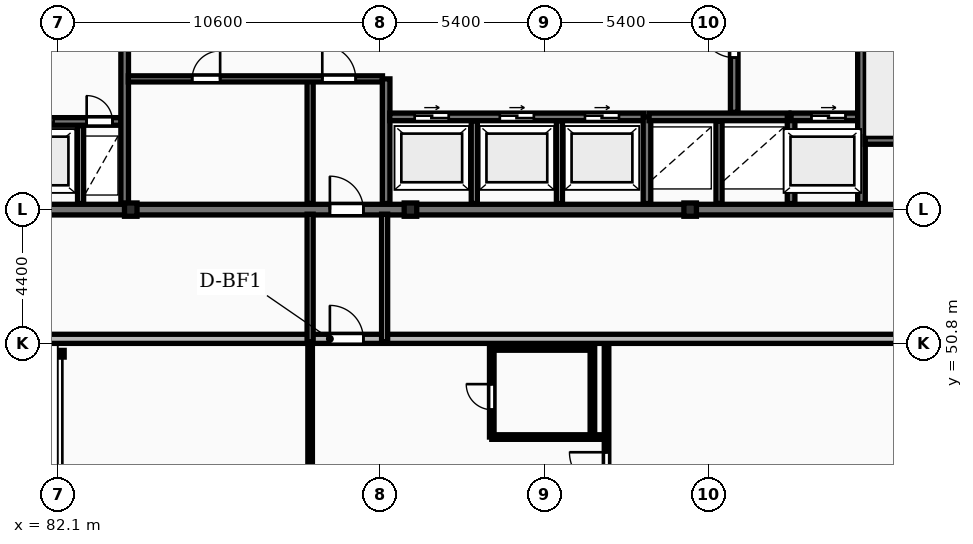
"""IFC4 building model, lengths in metres.
Left out: names, types, materials, properties, quantities, classifications, styles, units other than length and angle.
Written with IfcOpenShell. Run it as: python <this file> out.ifc"""

import sys

from ifc_helpers import new_model, si_unit, direction, frame, frame_2d, origin, origin_2d, place, context, subcontext, project, spatial, rectangle, i_section, extrude, element, fill, save


model = new_model("IFC4")
c1 = context("Model", 3, precision=1e-05, world=origin(), true_north=direction((0.0, 1.0)))
c2 = subcontext(c1, "Body", "Model", "MODEL_VIEW")
j1 = project(units=[si_unit("LENGTHUNIT", "METRE"), si_unit("PLANEANGLEUNIT", "RADIAN")], contexts=[c1])
p1 = place(None, origin())
s1 = spatial("IfcSite", under=j1, at=p1, CompositionType="ELEMENT")
p2 = place(p1, origin())
s2 = spatial("IfcBuilding", under=s1, at=p2, CompositionType="ELEMENT")
p3 = place(p2, frame((0.0, 0.0, 139.3)))
s3 = spatial("IfcBuildingStorey", under=s2, at=p3, CompositionType="ELEMENT", Elevation=139.3)
for number, where, z_axis, x_axis in (
    (1, (84.5, 55.2, 0.0), (0.0, 0.0, 1.0), (1.0, 0.0, 0.0)),
    (2, (93.7, 55.2, 0.0), (0.0, 0.0, 1.0), (1.0, 0.0, 0.0)),
    (3, (102.9, 55.2, 0.0), (0.0, 0.0, 1.0), (1.0, 0.0, 0.0)),
):
    element("IfcColumn", number, at=place(p3, frame(where, z_axis=z_axis, x_axis=x_axis)), inside=s3, PredefinedType="COLUMN", context=c2, shape_type="SweptSolid", body=[
        extrude(i_section(OverallWidth=0.412, OverallDepth=0.437, WebThickness=0.036, FlangeThickness=0.052, FilletRadius=0.015, at=origin_2d()), origin(), (0.0, 0.0, 1.0), 3.6),
    ])
p4 = place(p3, frame((57.6, 50.95, 0.0), z_axis=(0.0, 0.0, 1.0), x_axis=(1.0, 0.0, 0.0)))
e4 = element("IfcWall", 4, at=p4, inside=s3, PredefinedType="STANDARD", context=c2, shape_type="SweptSolid", body=[
    extrude(rectangle(XDim=73.0, YDim=0.3, at=frame_2d((36.5, 0.0))), origin(), (0.0, 0.0, 1.0), 3.31),
])
p5 = place(p4, frame((15.225, 0.0, 0.85)))
e5 = element("IfcOpeningElement", 5, at=p5, cuts=e4, PredefinedType="OPENING", context=c2, shape_type="SweptSolid", body=[
    extrude(rectangle(XDim=1.8, YDim=1.8, at=frame_2d((0.9, 0.9))), frame((0.0, 0.16, 0.0), z_axis=(0.0, -1.0, 0.0), x_axis=(1.0, 0.0, 0.0)), (0.0, 0.0, 1.0), 0.32),
])
p6 = place(p4, frame((58.575, 0.0, 0.85)))
e6 = element("IfcOpeningElement", 6, at=p6, cuts=e4, PredefinedType="OPENING", context=c2, shape_type="SweptSolid", body=[
    extrude(rectangle(XDim=1.8, YDim=1.8, at=frame_2d((0.9, 0.9))), frame((0.0, 0.16, 0.0), z_axis=(0.0, -1.0, 0.0), x_axis=(1.0, 0.0, 0.0)), (0.0, 0.0, 1.0), 0.32),
])
p7 = place(p4, frame((33.45, 0.0, 0.0)))
e7 = element("IfcOpeningElement", 7, at=p7, cuts=e4, PredefinedType="OPENING", context=c2, shape_type="SweptSolid", body=[
    extrude(rectangle(XDim=1.1, YDim=2.1, at=frame_2d((0.55, 1.05))), frame((0.0, 0.16, 0.0), z_axis=(0.0, -1.0, 0.0), x_axis=(1.0, 0.0, 0.0)), (0.0, 0.0, 1.0), 0.32),
])
p8 = place(p3, frame((75.95, 55.2, 0.0), z_axis=(0.0, 0.0, 1.0), x_axis=(1.0, 0.0, 0.0)))
e8 = element("IfcWall", 8, at=p8, inside=s3, PredefinedType="SHEAR", context=c2, shape_type="SweptSolid", body=[
    extrude(rectangle(XDim=36.3, YDim=0.35, at=frame_2d((18.15, 0.0))), origin(), (0.0, 0.0, 1.0), 3.6),
])
p9 = place(p8, frame((15.1, 0.0, 0.0)))
e9 = element("IfcOpeningElement", 9, at=p9, cuts=e8, PredefinedType="OPENING", context=c2, shape_type="SweptSolid", body=[
    extrude(rectangle(XDim=1.1, YDim=2.1, at=frame_2d((0.55, 1.05))), frame((0.0, 0.185, 0.0), z_axis=(0.0, -1.0, 0.0), x_axis=(1.0, 0.0, 0.0)), (0.0, 0.0, 1.0), 0.37),
])
p10 = place(p3, frame((79.79, 58.1, 0.0), z_axis=(0.0, 0.0, 1.0), x_axis=(1.0, 0.0, 0.0)))
e10 = element("IfcWall", 10, at=p10, inside=s3, PredefinedType="SHEAR", context=c2, shape_type="SweptSolid", body=[
    extrude(rectangle(XDim=4.39, YDim=0.25, at=frame_2d((2.195, 0.0))), origin(), (0.0, 0.0, 1.0), 3.6),
])
p11 = place(p10, frame((1.05, 0.0, 0.0)))
e11 = element("IfcOpeningElement", 11, at=p11, cuts=e10, PredefinedType="OPENING", context=c2, shape_type="SweptSolid", body=[
    extrude(rectangle(XDim=1.12, YDim=2.12, at=frame_2d((0.56, 1.06))), frame((0.0, 0.135, 0.0), z_axis=(0.0, -1.0, 0.0), x_axis=(1.0, 0.0, 0.0)), (0.0, 0.0, 1.0), 0.27),
])
p12 = place(p10, frame((3.26, 0.0, 0.0)))
e12 = element("IfcOpeningElement", 12, at=p12, cuts=e10, PredefinedType="OPENING", context=c2, shape_type="SweptSolid", body=[
    extrude(rectangle(XDim=0.85, YDim=2.05, at=frame_2d((0.425, 1.025))), frame((0.0, 0.135, 0.0), z_axis=(0.0, -1.0, 0.0), x_axis=(1.0, 0.0, 0.0)), (0.0, 0.0, 1.0), 0.27),
])
p13 = place(p3, frame((82.85, 55.4, 0.0), z_axis=(0.0, 0.0, 1.0), x_axis=(0.0, 1.0, 0.0)))
e13 = element("IfcWall", 13, at=p13, inside=s3, PredefinedType="PARTITIONING", context=c2, shape_type="SweptSolid", body=[
    extrude(rectangle(XDim=2.56, YDim=0.2, at=frame_2d((1.28, 0.0))), origin(), (0.0, 0.0, 1.0), 3.31),
])
p14 = place(p3, frame((84.3, 55.4, 0.0), z_axis=(0.0, 0.0, 1.0), x_axis=(0.0, 1.0, 0.0)))
e14 = element("IfcWall", 14, at=p14, inside=s3, PredefinedType="SHEAR", context=c2, shape_type="SweptSolid", body=[
    extrude(rectangle(XDim=11.6, YDim=0.25, at=frame_2d((5.8, 0.0))), origin(), (0.0, 0.0, 1.0), 3.6),
])
p15 = place(p14, frame((5.2, 0.0, 0.0)))
e15 = element("IfcOpeningElement", 15, at=p15, cuts=e14, PredefinedType="OPENING", context=c2, shape_type="SweptSolid", body=[
    extrude(rectangle(XDim=1.1, YDim=2.1, at=frame_2d((0.55, 1.05))), frame((0.0, 0.135, 0.0), z_axis=(0.0, -1.0, 0.0), x_axis=(1.0, 0.0, 0.0)), (0.0, 0.0, 1.0), 0.27),
])
p16 = place(p3, frame((90.4, 55.4, 0.0), z_axis=(0.0, 0.0, 1.0), x_axis=(0.0, 1.0, 0.0)))
e16 = element("IfcWall", 16, at=p16, inside=s3, PredefinedType="PARTITIONING", context=c2, shape_type="SweptSolid", body=[
    extrude(rectangle(XDim=4.1, YDim=0.2, at=frame_2d((2.05, 0.0))), origin(), (0.0, 0.0, 1.0), 3.31),
])
p17 = place(p3, frame((84.42, 59.5, 0.0), z_axis=(0.0, 0.0, 1.0), x_axis=(1.0, 0.0, 0.0)))
e17 = element("IfcWall", 17, at=p17, inside=s3, PredefinedType="PARTITIONING", context=c2, shape_type="SweptSolid", body=[
    extrude(rectangle(XDim=8.36, YDim=0.2, at=frame_2d((4.18, 0.0))), origin(), (0.0, 0.0, 1.0), 3.31),
])
p18 = place(p17, frame((2.1, 0.0, 0.0)))
e18 = element("IfcOpeningElement", 18, at=p18, cuts=e17, PredefinedType="OPENING", context=c2, shape_type="SweptSolid", body=[
    extrude(rectangle(XDim=0.92, YDim=2.08, at=frame_2d((0.46, 1.04))), frame((0.0, 0.11, 0.0), z_axis=(0.0, -1.0, 0.0), x_axis=(1.0, 0.0, 0.0)), (0.0, 0.0, 1.0), 0.22),
])
p19 = place(p17, frame((6.38, 0.0, 0.0)))
e19 = element("IfcOpeningElement", 19, at=p19, cuts=e17, PredefinedType="OPENING", context=c2, shape_type="SweptSolid", body=[
    extrude(rectangle(XDim=1.1, YDim=2.1, at=frame_2d((0.55, 1.05))), frame((0.0, 0.11, 0.0), z_axis=(0.0, -1.0, 0.0), x_axis=(1.0, 0.0, 0.0)), (0.0, 0.0, 1.0), 0.22),
])
p20 = place(p3, frame((92.9, 55.4, 0.0), z_axis=(0.0, 0.0, 1.0), x_axis=(0.0, 1.0, 0.0)))
e20 = element("IfcWall", 20, at=p20, inside=s3, PredefinedType="SHEAR", context=c2, shape_type="SweptSolid", body=[
    extrude(rectangle(XDim=4.1, YDim=0.25, at=frame_2d((2.05, 0.0))), origin(), (0.0, 0.0, 1.0), 3.6),
])
for number, where, z_axis, x_axis in (
    (21, (95.8, 55.4, 0.0), (0.0, 0.0, 1.0), (0.0, 1.0, 0.0)),
    (22, (98.6, 55.4, 0.0), (0.0, 0.0, 1.0), (0.0, 1.0, 0.0)),
):
    element("IfcWall", number, at=place(p3, frame(where, z_axis=z_axis, x_axis=x_axis)), inside=s3, PredefinedType="PARTITIONING", context=c2, shape_type="SweptSolid", body=[
        extrude(rectangle(XDim=2.72, YDim=0.2, at=frame_2d((1.36, 0.0))), origin(), (0.0, 0.0, 1.0), 3.31),
    ])
p21 = place(p3, frame((93.02, 58.25, 0.0), z_axis=(0.0, 0.0, 1.0), x_axis=(1.0, 0.0, 0.0)))
e23 = element("IfcWall", 23, at=p21, inside=s3, PredefinedType="SHEAR", context=c2, shape_type="SweptSolid", body=[
    extrude(rectangle(XDim=8.36, YDim=0.25, at=frame_2d((4.18, 0.0))), origin(), (0.0, 0.0, 1.0), 3.6),
])
p22 = place(p21, frame((0.82, 0.0, 0.0)))
e24 = element("IfcOpeningElement", 24, at=p22, cuts=e23, PredefinedType="OPENING", context=c2, shape_type="SweptSolid", body=[
    extrude(rectangle(XDim=1.12, YDim=2.12, at=frame_2d((0.56, 1.06))), frame((0.0, 0.135, 0.0), z_axis=(0.0, -1.0, 0.0), x_axis=(1.0, 0.0, 0.0)), (0.0, 0.0, 1.0), 0.27),
])
p23 = place(p21, frame((3.62, 0.0, 0.0)))
e25 = element("IfcOpeningElement", 25, at=p23, cuts=e23, PredefinedType="OPENING", context=c2, shape_type="SweptSolid", body=[
    extrude(rectangle(XDim=1.12, YDim=2.12, at=frame_2d((0.56, 1.06))), frame((0.0, 0.135, 0.0), z_axis=(0.0, -1.0, 0.0), x_axis=(1.0, 0.0, 0.0)), (0.0, 0.0, 1.0), 0.27),
])
p24 = place(p21, frame((6.42, 0.0, 0.0)))
e26 = element("IfcOpeningElement", 26, at=p24, cuts=e23, PredefinedType="OPENING", context=c2, shape_type="SweptSolid", body=[
    extrude(rectangle(XDim=1.12, YDim=2.12, at=frame_2d((0.56, 1.06))), frame((0.0, 0.135, 0.0), z_axis=(0.0, -1.0, 0.0), x_axis=(1.0, 0.0, 0.0)), (0.0, 0.0, 1.0), 0.27),
])
p25 = place(p3, frame((101.48, 55.4, 0.0), z_axis=(0.0, 0.0, 1.0), x_axis=(0.0, 1.0, 0.0)))
e27 = element("IfcWall", 27, at=p25, inside=s3, PredefinedType="SHEAR", context=c2, shape_type="SweptSolid", body=[
    extrude(rectangle(XDim=2.85, YDim=0.25, at=frame_2d((1.425, 0.0))), origin(), (0.0, 0.0, 1.0), 3.6),
])
p26 = place(p3, frame((103.85, 55.4, 0.0), z_axis=(0.0, 0.0, 1.0), x_axis=(0.0, 1.0, 0.0)))
e28 = element("IfcWall", 28, at=p26, inside=s3, PredefinedType="PARTITIONING", context=c2, shape_type="SweptSolid", body=[
    extrude(rectangle(XDim=2.72, YDim=0.2, at=frame_2d((1.36, 0.0))), origin(), (0.0, 0.0, 1.0), 3.31),
])
p27 = place(p3, frame((101.55, 58.25, 0.0), z_axis=(0.0, 0.0, 1.0), x_axis=(1.0, 0.0, 0.0)))
e29 = element("IfcWall", 29, at=p27, inside=s3, PredefinedType="SHEAR", context=c2, shape_type="SweptSolid", body=[
    extrude(rectangle(XDim=4.6, YDim=0.25, at=frame_2d((2.3, 0.0))), origin(), (0.0, 0.0, 1.0), 3.6),
])
p28 = place(p3, frame((106.22, 55.4, 0.0), z_axis=(0.0, 0.0, 1.0), x_axis=(0.0, 1.0, 0.0)))
e30 = element("IfcWall", 30, at=p28, inside=s3, PredefinedType="SHEAR", context=c2, shape_type="SweptSolid", body=[
    extrude(rectangle(XDim=2.85, YDim=0.25, at=frame_2d((1.425, 0.0))), origin(), (0.0, 0.0, 1.0), 3.6),
])
p29 = place(p3, frame((106.22, 58.25, 0.0), z_axis=(0.0, 0.0, 1.0), x_axis=(1.0, 0.0, 0.0)))
e31 = element("IfcWall", 31, at=p29, inside=s3, PredefinedType="SHEAR", context=c2, shape_type="SweptSolid", body=[
    extrude(rectangle(XDim=2.46, YDim=0.25, at=frame_2d((1.23, 0.0))), origin(), (0.0, 0.0, 1.0), 3.6),
])
p30 = place(p29, frame((0.67, 0.0, 0.0)))
e32 = element("IfcOpeningElement", 32, at=p30, cuts=e31, PredefinedType="OPENING", context=c2, shape_type="SweptSolid", body=[
    extrude(rectangle(XDim=1.12, YDim=2.12, at=frame_2d((0.56, 1.06))), frame((0.0, 0.135, 0.0), z_axis=(0.0, -1.0, 0.0), x_axis=(1.0, 0.0, 0.0)), (0.0, 0.0, 1.0), 0.27),
])
p31 = place(p3, frame((104.35, 58.4, 0.0), z_axis=(0.0, 0.0, 1.0), x_axis=(0.0, 1.0, 0.0)))
e33 = element("IfcWall", 33, at=p31, inside=s3, PredefinedType="SHEAR", context=c2, shape_type="SweptSolid", body=[
    extrude(rectangle(XDim=8.6, YDim=0.25, at=frame_2d((4.3, 0.0))), origin(), (0.0, 0.0, 1.0), 3.6),
])
p32 = place(p31, frame((1.8, 0.0, 0.0)))
e34 = element("IfcOpeningElement", 34, at=p32, cuts=e33, PredefinedType="OPENING", context=c2, shape_type="SweptSolid", body=[
    extrude(rectangle(XDim=1.1, YDim=2.1, at=frame_2d((0.55, 1.05))), frame((0.0, 0.135, 0.0), z_axis=(0.0, -1.0, 0.0), x_axis=(1.0, 0.0, 0.0)), (0.0, 0.0, 1.0), 0.27),
])
p33 = place(p3, frame((108.535, 55.4, 0.0), z_axis=(0.0, 0.0, 1.0), x_axis=(0.0, 1.0, 0.0)))
e35 = element("IfcWall", 35, at=p33, inside=s3, PredefinedType="SHEAR", context=c2, shape_type="SweptSolid", body=[
    extrude(rectangle(XDim=11.6, YDim=0.25, at=frame_2d((5.8, 0.0))), origin(), (0.0, 0.0, 1.0), 3.6),
])
p34 = place(p33, frame((8.2, 0.0, 0.0)))
e36 = element("IfcOpeningElement", 36, at=p34, cuts=e35, PredefinedType="OPENING", context=c2, shape_type="SweptSolid", body=[
    extrude(rectangle(XDim=1.1, YDim=2.1, at=frame_2d((0.55, 1.05))), frame((0.0, 0.135, 0.0), z_axis=(0.0, -1.0, 0.0), x_axis=(1.0, 0.0, 0.0)), (0.0, 0.0, 1.0), 0.27),
])
p35 = place(p33, frame((10.25, 0.0, 0.0)))
e37 = element("IfcOpeningElement", 37, at=p35, cuts=e35, PredefinedType="OPENING", context=c2, shape_type="SweptSolid", body=[
    extrude(rectangle(XDim=0.85, YDim=2.05, at=frame_2d((0.425, 1.025))), frame((0.0, 0.135, 0.0), z_axis=(0.0, -1.0, 0.0), x_axis=(1.0, 0.0, 0.0)), (0.0, 0.0, 1.0), 0.27),
])
p36 = place(p3, frame((108.66, 57.475, 0.0), z_axis=(0.0, 0.0, 1.0), x_axis=(1.0, 0.0, 0.0)))
e38 = element("IfcWall", 38, at=p36, inside=s3, PredefinedType="SHEAR", context=c2, shape_type="SweptSolid", body=[
    extrude(rectangle(XDim=3.24, YDim=0.25, at=frame_2d((1.62, 0.0))), origin(), (0.0, 0.0, 1.0), 3.6),
])
for number, where, z_axis, x_axis in (
    (39, (90.4, 50.85, 0.0), (0.0, 0.0, 1.0), (0.0, 1.0, 0.0)),
    (40, (92.85, 50.85, 0.0), (0.0, 0.0, 1.0), (0.0, 1.0, 0.0)),
):
    element("IfcWall", number, at=place(p3, frame(where, z_axis=z_axis, x_axis=x_axis)), inside=s3, PredefinedType="PARTITIONING", context=c2, shape_type="SweptSolid", body=[
        extrude(rectangle(XDim=4.2, YDim=0.2, at=frame_2d((2.1, 0.0))), origin(), (0.0, 0.0, 1.0), 3.31),
    ])
p37 = place(p3, frame((96.375, 50.65, 0.0), z_axis=(0.0, 0.0, 1.0), x_axis=(1.0, 0.0, 0.0)))
e41 = element("IfcWall", 41, at=p37, inside=s3, PredefinedType="PARTITIONING", context=c2, shape_type="SweptSolid", body=[
    extrude(rectangle(XDim=3.31, YDim=0.15, at=frame_2d((1.655, 0.0))), origin(), (0.0, 0.0, 1.0), 2.69),
])
p38 = place(p3, frame((96.375, 47.72, 0.0), z_axis=(0.0, 0.0, 1.0), x_axis=(0.0, 1.0, 0.0)))
e42 = element("IfcWall", 42, at=p38, inside=s3, PredefinedType="PARTITIONING", context=c2, shape_type="SweptSolid", body=[
    extrude(rectangle(XDim=2.93, YDim=0.15, at=frame_2d((1.465, 0.0))), origin(), (0.0, 0.0, 1.0), 2.383),
])
p39 = place(p38, frame((0.9, 0.0, 0.0)))
e43 = element("IfcOpeningElement", 43, at=p39, cuts=e42, PredefinedType="OPENING", context=c2, shape_type="SweptSolid", body=[
    extrude(rectangle(XDim=0.84, YDim=2.04, at=frame_2d((0.42, 1.02))), frame((0.0, 0.085, 0.0), z_axis=(0.0, -1.0, 0.0), x_axis=(1.0, 0.0, 0.0)), (0.0, 0.0, 1.0), 0.17),
])
p40 = place(p3, frame((96.375, 47.72, 0.0), z_axis=(0.0, 0.0, 1.0), x_axis=(1.0, 0.0, 0.0)))
e44 = element("IfcWall", 44, at=p40, inside=s3, PredefinedType="PARTITIONING", context=c2, shape_type="SweptSolid", body=[
    extrude(rectangle(XDim=3.775, YDim=0.15, at=frame_2d((1.887, 0.0))), origin(), (0.0, 0.0, 1.0), 3.31),
])
p41 = place(p3, frame((99.685, 47.72, 0.0), z_axis=(0.0, 0.0, 1.0), x_axis=(0.0, 1.0, 0.0)))
e45 = element("IfcWall", 45, at=p41, inside=s3, PredefinedType="PARTITIONING", context=c2, shape_type="SweptSolid", body=[
    extrude(rectangle(XDim=2.93, YDim=0.15, at=frame_2d((1.465, 0.0))), origin(), (0.0, 0.0, 1.0), 2.383),
])
p42 = place(p3, frame((90.4, 32.9, 0.0), z_axis=(0.0, 0.0, 1.0), x_axis=(0.0, 1.0, 0.0)))
e46 = element("IfcWall", 46, at=p42, inside=s3, PredefinedType="PARTITIONING", context=c2, shape_type="SweptSolid", body=[
    extrude(rectangle(XDim=17.8, YDim=0.15, at=frame_2d((8.9, 0.0))), origin(), (0.0, 0.0, 1.0), 3.31),
])
p43 = place(p42, frame((8.2, 0.0, 0.0)))
e47 = element("IfcOpeningElement", 47, at=p43, cuts=e46, PredefinedType="OPENING", context=c2, shape_type="SweptSolid", body=[
    extrude(rectangle(XDim=1.22, YDim=2.18, at=frame_2d((0.61, 1.09))), frame((0.0, 0.085, 0.0), z_axis=(0.0, -1.0, 0.0), x_axis=(1.0, 0.0, 0.0)), (0.0, 0.0, 1.0), 0.17),
])
p44 = place(p3, frame((100.15, 32.9, 0.0), z_axis=(0.0, 0.0, 1.0), x_axis=(0.0, 1.0, 0.0)))
e48 = element("IfcWall", 48, at=p44, inside=s3, PredefinedType="PARTITIONING", context=c2, shape_type="SweptSolid", body=[
    extrude(rectangle(XDim=17.8, YDim=0.15, at=frame_2d((8.9, 0.0))), origin(), (0.0, 0.0, 1.0), 3.31),
])
p45 = place(p44, frame((13.1, 0.0, 0.0)))
e49 = element("IfcOpeningElement", 49, at=p45, cuts=e48, PredefinedType="OPENING", context=c2, shape_type="SweptSolid", body=[
    extrude(rectangle(XDim=1.22, YDim=2.18, at=frame_2d((0.61, 1.09))), frame((0.0, 0.085, 0.0), z_axis=(0.0, -1.0, 0.0), x_axis=(1.0, 0.0, 0.0)), (0.0, 0.0, 1.0), 0.17),
])
p46 = place(p7, origin())
e50 = element("IfcDoor", 50, at=p46, inside=s3, OperationType="SINGLE_SWING_LEFT", PredefinedType="DOOR", context=c2, shape_type="SweptSolid", body=[
    extrude(rectangle(XDim=1.1, YDim=2.1, at=frame_2d((0.55, 1.05))), frame((0.0, 0.025, 0.0), z_axis=(0.0, -1.0, 0.0), x_axis=(1.0, 0.0, 0.0)), (0.0, 0.0, 1.0), 0.05),
])
fill(e7, e50)
p47 = place(p9, origin())
e51 = element("IfcDoor", 51, at=p47, inside=s3, OperationType="SINGLE_SWING_LEFT", PredefinedType="DOOR", context=c2, shape_type="SweptSolid", body=[
    extrude(rectangle(XDim=1.1, YDim=2.1, at=frame_2d((0.55, 1.05))), frame((0.0, 0.025, 0.0), z_axis=(0.0, -1.0, 0.0), x_axis=(1.0, 0.0, 0.0)), (0.0, 0.0, 1.0), 0.05),
])
fill(e9, e51)
p48 = place(p11, origin())
e52 = element("IfcDoor", 52, at=p48, inside=s3, OperationType="SLIDING_TO_LEFT", PredefinedType="DOOR", context=c2, shape_type="SweptSolid", body=[
    extrude(rectangle(XDim=1.12, YDim=2.12, at=frame_2d((0.56, 1.06))), frame((0.0, 0.025, 0.0), z_axis=(0.0, -1.0, 0.0), x_axis=(1.0, 0.0, 0.0)), (0.0, 0.0, 1.0), 0.05),
])
fill(e11, e52)
p49 = place(p12, origin())
e53 = element("IfcDoor", 53, at=p49, inside=s3, OperationType="SINGLE_SWING_LEFT", PredefinedType="DOOR", context=c2, shape_type="SweptSolid", body=[
    extrude(rectangle(XDim=0.85, YDim=2.05, at=frame_2d((0.425, 1.025))), frame((0.0, 0.025, 0.0), z_axis=(0.0, -1.0, 0.0), x_axis=(1.0, 0.0, 0.0)), (0.0, 0.0, 1.0), 0.05),
])
fill(e12, e53)
p50 = place(p18, origin())
e54 = element("IfcDoor", 54, at=p50, inside=s3, OperationType="SINGLE_SWING_RIGHT", PredefinedType="DOOR", context=c2, shape_type="SweptSolid", body=[
    extrude(rectangle(XDim=0.92, YDim=2.08, at=frame_2d((0.46, 1.04))), frame((0.0, 0.025, 0.0), z_axis=(0.0, -1.0, 0.0), x_axis=(1.0, 0.0, 0.0)), (0.0, 0.0, 1.0), 0.05),
])
fill(e18, e54)
p51 = place(p19, origin())
e55 = element("IfcDoor", 55, at=p51, inside=s3, OperationType="SINGLE_SWING_LEFT", PredefinedType="DOOR", context=c2, shape_type="SweptSolid", body=[
    extrude(rectangle(XDim=1.1, YDim=2.1, at=frame_2d((0.55, 1.05))), frame((0.0, 0.025, 0.0), z_axis=(0.0, -1.0, 0.0), x_axis=(1.0, 0.0, 0.0)), (0.0, 0.0, 1.0), 0.05),
])
fill(e19, e55)
p52 = place(p22, origin())
e56 = element("IfcDoor", 56, at=p52, inside=s3, OperationType="SLIDING_TO_RIGHT", PredefinedType="DOOR", context=c2, shape_type="SweptSolid", body=[
    extrude(rectangle(XDim=1.12, YDim=2.12, at=frame_2d((0.56, 1.06))), frame((0.0, 0.025, 0.0), z_axis=(0.0, -1.0, 0.0), x_axis=(1.0, 0.0, 0.0)), (0.0, 0.0, 1.0), 0.05),
])
fill(e24, e56)
p53 = place(p23, origin())
e57 = element("IfcDoor", 57, at=p53, inside=s3, OperationType="SLIDING_TO_RIGHT", PredefinedType="DOOR", context=c2, shape_type="SweptSolid", body=[
    extrude(rectangle(XDim=1.12, YDim=2.12, at=frame_2d((0.56, 1.06))), frame((0.0, 0.025, 0.0), z_axis=(0.0, -1.0, 0.0), x_axis=(1.0, 0.0, 0.0)), (0.0, 0.0, 1.0), 0.05),
])
fill(e25, e57)
p54 = place(p24, origin())
e58 = element("IfcDoor", 58, at=p54, inside=s3, OperationType="SLIDING_TO_RIGHT", PredefinedType="DOOR", context=c2, shape_type="SweptSolid", body=[
    extrude(rectangle(XDim=1.12, YDim=2.12, at=frame_2d((0.56, 1.06))), frame((0.0, 0.025, 0.0), z_axis=(0.0, -1.0, 0.0), x_axis=(1.0, 0.0, 0.0)), (0.0, 0.0, 1.0), 0.05),
])
fill(e26, e58)
p55 = place(p30, origin())
e59 = element("IfcDoor", 59, at=p55, inside=s3, OperationType="SLIDING_TO_RIGHT", PredefinedType="DOOR", context=c2, shape_type="SweptSolid", body=[
    extrude(rectangle(XDim=1.12, YDim=2.12, at=frame_2d((0.56, 1.06))), frame((0.0, 0.025, 0.0), z_axis=(0.0, -1.0, 0.0), x_axis=(1.0, 0.0, 0.0)), (0.0, 0.0, 1.0), 0.05),
])
fill(e32, e59)
p56 = place(p32, origin())
e60 = element("IfcDoor", 60, at=p56, inside=s3, OperationType="SINGLE_SWING_RIGHT", PredefinedType="DOOR", context=c2, shape_type="SweptSolid", body=[
    extrude(rectangle(XDim=1.1, YDim=2.1, at=frame_2d((0.55, 1.05))), frame((0.0, 0.025, 0.0), z_axis=(0.0, -1.0, 0.0), x_axis=(1.0, 0.0, 0.0)), (0.0, 0.0, 1.0), 0.05),
])
fill(e34, e60)
p57 = place(p39, origin())
e61 = element("IfcDoor", 61, at=p57, inside=s3, OperationType="SINGLE_SWING_RIGHT", PredefinedType="DOOR", context=c2, shape_type="SweptSolid", body=[
    extrude(rectangle(XDim=0.84, YDim=2.04, at=frame_2d((0.42, 1.02))), frame((0.0, 0.025, 0.0), z_axis=(0.0, -1.0, 0.0), x_axis=(1.0, 0.0, 0.0)), (0.0, 0.0, 1.0), 0.05),
])
fill(e43, e61)
p58 = place(p45, origin())
e62 = element("IfcDoor", 62, at=p58, inside=s3, OperationType="SINGLE_SWING_RIGHT", PredefinedType="DOOR", context=c2, shape_type="SweptSolid", body=[
    extrude(rectangle(XDim=1.22, YDim=2.18, at=frame_2d((0.61, 1.09))), frame((0.0, 0.025, 0.0), z_axis=(0.0, -1.0, 0.0), x_axis=(1.0, 0.0, 0.0)), (0.0, 0.0, 1.0), 0.05),
])
fill(e49, e62)
save(model, sys.argv[1])
